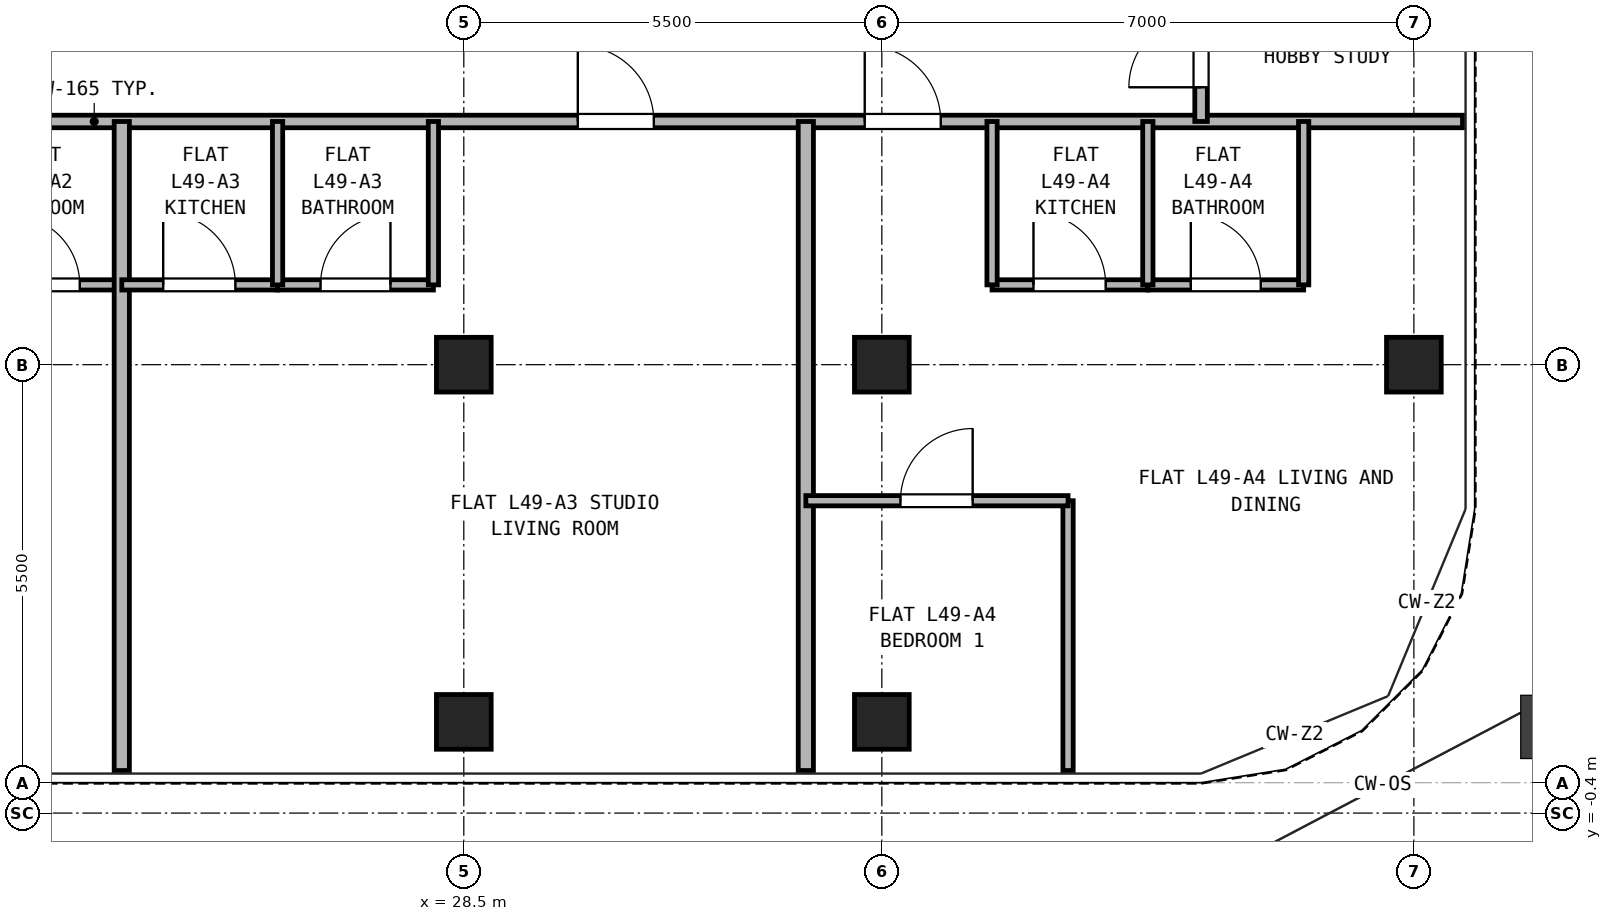
"""IFC4 building model, lengths in metres.
Left out: names, types, materials, properties, quantities, classifications, styles, units other than length and angle.
Written with IfcOpenShell. Run it as: python <this file> out.ifc"""

import sys

from ifc_helpers import new_model, si_unit, direction, frame, frame_2d, origin, origin_2d, place, context, subcontext, project, spatial, rectangle, hollow_rectangle, extrude, source, transform, mapped, element, fill, save


model = new_model("IFC4")
c1 = context("Model", 3, precision=1e-05, world=origin(), true_north=direction((0.0, 1.0)))
c2 = subcontext(c1, "Body", "Model", "MODEL_VIEW")
j1 = project(units=[si_unit("LENGTHUNIT", "METRE"), si_unit("PLANEANGLEUNIT", "RADIAN")], contexts=[c1])
p1 = place(None, origin())
s1 = spatial("IfcSite", under=j1, at=p1, CompositionType="ELEMENT")
p2 = place(p1, origin())
s2 = spatial("IfcBuilding", under=s1, at=p2, CompositionType="ELEMENT")
p3 = place(p2, frame((0.0, 0.0, 175.3)))
s3 = spatial("IfcBuildingStorey", under=s2, at=p3, CompositionType="ELEMENT", Elevation=175.3)
m1 = source(origin(), c2, "Body", "SweptSolid", [
    extrude(hollow_rectangle(XDim=0.72, YDim=0.72, WallThickness=0.04, at=origin_2d()), origin(), (0.0, 0.0, 1.0), 2.95),
])
for number, where, z_axis, x_axis in (
    (1, (28.5, 0.8, 0.0), (0.0, 0.0, 1.0), (1.0, 0.0, 0.0)),
    (2, (34.0, 0.8, 0.0), (0.0, 0.0, 1.0), (1.0, 0.0, 0.0)),
    (3, (41.0, 5.5, 0.0), (0.0, 0.0, 1.0), (1.0, 0.0, 0.0)),
    (4, (28.5, 5.5, 0.0), (0.0, 0.0, 1.0), (1.0, 0.0, 0.0)),
    (5, (34.0, 5.5, 0.0), (0.0, 0.0, 1.0), (1.0, 0.0, 0.0)),
):
    element("IfcColumn", number, at=place(p3, frame(where, z_axis=z_axis, x_axis=x_axis)), inside=s3, PredefinedType="COLUMN", context=c2, shape_type="MappedRepresentation", body=[
        mapped(m1, transform((0.0, 0.0, 0.0), x_axis=(1.0, 0.0, 0.0), y_axis=(0.0, 1.0, 0.0), z_axis=(0.0, 0.0, 1.0), scale=1.0)),
    ])
p4 = place(p3, frame((0.16, 8.7, 0.0), z_axis=(0.0, 0.0, 1.0), x_axis=(1.0, 0.0, 0.0)))
e6 = element("IfcWall", 6, at=p4, inside=s3, PredefinedType="PARTITIONING", context=c2, shape_type="SweptSolid", body=[
    extrude(rectangle(XDim=41.48, YDim=0.165, at=frame_2d((20.74, 0.0))), origin(), (0.0, 0.0, 1.0), 2.583),
])
p5 = place(p4, frame((11.815, 0.0, 0.0)))
e7 = element("IfcOpeningElement", 7, at=p5, cuts=e6, PredefinedType="OPENING", context=c2, shape_type="SweptSolid", body=[
    extrude(rectangle(XDim=1.0, YDim=2.15, at=frame_2d((0.5, 1.075))), frame((0.0, 0.093, 0.0), z_axis=(0.0, -1.0, 0.0), x_axis=(1.0, 0.0, 0.0)), (0.0, 0.0, 1.0), 0.185),
])
p6 = place(p4, frame((16.115, 0.0, 0.0)))
e8 = element("IfcOpeningElement", 8, at=p6, cuts=e6, PredefinedType="OPENING", context=c2, shape_type="SweptSolid", body=[
    extrude(rectangle(XDim=1.0, YDim=2.15, at=frame_2d((0.5, 1.075))), frame((0.0, 0.093, 0.0), z_axis=(0.0, -1.0, 0.0), x_axis=(1.0, 0.0, 0.0)), (0.0, 0.0, 1.0), 0.185),
])
p7 = place(p4, frame((29.84, 0.0, 0.0)))
e9 = element("IfcOpeningElement", 9, at=p7, cuts=e6, PredefinedType="OPENING", context=c2, shape_type="SweptSolid", body=[
    extrude(rectangle(XDim=1.0, YDim=2.15, at=frame_2d((0.5, 1.075))), frame((0.0, 0.093, 0.0), z_axis=(0.0, -1.0, 0.0), x_axis=(1.0, 0.0, 0.0)), (0.0, 0.0, 1.0), 0.185),
])
p8 = place(p4, frame((33.615, 0.0, 0.0)))
e10 = element("IfcOpeningElement", 10, at=p8, cuts=e6, PredefinedType="OPENING", context=c2, shape_type="SweptSolid", body=[
    extrude(rectangle(XDim=1.0, YDim=2.15, at=frame_2d((0.5, 1.075))), frame((0.0, 0.093, 0.0), z_axis=(0.0, -1.0, 0.0), x_axis=(1.0, 0.0, 0.0)), (0.0, 0.0, 1.0), 0.185),
])
p9 = place(p3, frame((38.2, 8.7, 0.0), z_axis=(0.0, 0.0, 1.0), x_axis=(0.0, 1.0, 0.0)))
e11 = element("IfcWall", 11, at=p9, inside=s3, PredefinedType="PARTITIONING", context=c2, shape_type="SweptSolid", body=[
    extrude(rectangle(XDim=2.0, YDim=0.165, at=frame_2d((1.0, 0.0))), origin(), (0.0, 0.0, 1.0), 2.95),
])
p10 = place(p9, frame((0.45, 0.0, 0.0)))
e12 = element("IfcOpeningElement", 12, at=p10, cuts=e11, PredefinedType="OPENING", context=c2, shape_type="SweptSolid", body=[
    extrude(rectangle(XDim=0.95, YDim=2.15, at=frame_2d((0.475, 1.075))), frame((0.0, 0.093, 0.0), z_axis=(0.0, -1.0, 0.0), x_axis=(1.0, 0.0, 0.0)), (0.0, 0.0, 1.0), 0.185),
])
p11 = place(p3, frame((21.975, 6.55, 0.0), z_axis=(0.0, 0.0, 1.0), x_axis=(1.0, 0.0, 0.0)))
e13 = element("IfcWall", 13, at=p11, inside=s3, PredefinedType="PARTITIONING", context=c2, shape_type="SweptSolid", body=[
    extrude(rectangle(XDim=2.025, YDim=0.135, at=frame_2d((1.012, 0.0))), origin(), (0.0, 0.0, 1.0), 2.95),
])
p12 = place(p11, frame((0.552, 0.0, 0.0)))
e14 = element("IfcOpeningElement", 14, at=p12, cuts=e13, PredefinedType="OPENING", context=c2, shape_type="SweptSolid", body=[
    extrude(rectangle(XDim=0.92, YDim=2.1, at=frame_2d((0.46, 1.05))), frame((0.0, 0.077, 0.0), z_axis=(0.0, -1.0, 0.0), x_axis=(1.0, 0.0, 0.0)), (0.0, 0.0, 1.0), 0.155),
])
p13 = place(p3, frame((24.0, 0.16, 0.0), z_axis=(0.0, 0.0, 1.0), x_axis=(0.0, 1.0, 0.0)))
e15 = element("IfcWall", 15, at=p13, inside=s3, PredefinedType="PARTITIONING", context=c2, shape_type="SweptSolid", body=[
    extrude(rectangle(XDim=8.54, YDim=0.2, at=frame_2d((4.27, 0.0))), origin(), (0.0, 0.0, 1.0), 2.95),
])
p14 = place(p3, frame((24.0, 6.55, 0.0), z_axis=(0.0, 0.0, 1.0), x_axis=(1.0, 0.0, 0.0)))
e16 = element("IfcWall", 16, at=p14, inside=s3, PredefinedType="PARTITIONING", context=c2, shape_type="SweptSolid", body=[
    extrude(rectangle(XDim=2.05, YDim=0.135, at=frame_2d((1.025, 0.0))), origin(), (0.0, 0.0, 1.0), 2.95),
])
p15 = place(p14, frame((0.545, 0.0, 0.0)))
e17 = element("IfcOpeningElement", 17, at=p15, cuts=e16, PredefinedType="OPENING", context=c2, shape_type="SweptSolid", body=[
    extrude(rectangle(XDim=0.95, YDim=2.15, at=frame_2d((0.475, 1.075))), frame((0.0, 0.077, 0.0), z_axis=(0.0, -1.0, 0.0), x_axis=(1.0, 0.0, 0.0)), (0.0, 0.0, 1.0), 0.155),
])
p16 = place(p3, frame((26.05, 6.55, 0.0), z_axis=(0.0, 0.0, 1.0), x_axis=(1.0, 0.0, 0.0)))
e18 = element("IfcWall", 18, at=p16, inside=s3, PredefinedType="PARTITIONING", context=c2, shape_type="SweptSolid", body=[
    extrude(rectangle(XDim=2.05, YDim=0.135, at=frame_2d((1.025, 0.0))), origin(), (0.0, 0.0, 1.0), 2.95),
])
p17 = place(p16, frame((0.565, 0.0, 0.0)))
e19 = element("IfcOpeningElement", 19, at=p17, cuts=e18, PredefinedType="OPENING", context=c2, shape_type="SweptSolid", body=[
    extrude(rectangle(XDim=0.92, YDim=2.1, at=frame_2d((0.46, 1.05))), frame((0.0, 0.077, 0.0), z_axis=(0.0, -1.0, 0.0), x_axis=(1.0, 0.0, 0.0)), (0.0, 0.0, 1.0), 0.155),
])
for number, where, z_axis, x_axis in (
    (20, (26.05, 6.55, 0.0), (0.0, 0.0, 1.0), (0.0, 1.0, 0.0)),
    (21, (28.1, 6.55, 0.0), (0.0, 0.0, 1.0), (0.0, 1.0, 0.0)),
):
    element("IfcWall", number, at=place(p3, frame(where, z_axis=z_axis, x_axis=x_axis)), inside=s3, PredefinedType="PARTITIONING", context=c2, shape_type="SweptSolid", body=[
        extrude(rectangle(XDim=2.15, YDim=0.135, at=frame_2d((1.075, 0.0))), origin(), (0.0, 0.0, 1.0), 2.95),
    ])
p18 = place(p3, frame((33.0, 0.16, 0.0), z_axis=(0.0, 0.0, 1.0), x_axis=(0.0, 1.0, 0.0)))
e22 = element("IfcWall", 22, at=p18, inside=s3, PredefinedType="PARTITIONING", context=c2, shape_type="SweptSolid", body=[
    extrude(rectangle(XDim=8.54, YDim=0.2, at=frame_2d((4.27, 0.0))), origin(), (0.0, 0.0, 1.0), 2.95),
])
p19 = place(p3, frame((35.45, 6.55, 0.0), z_axis=(0.0, 0.0, 1.0), x_axis=(1.0, 0.0, 0.0)))
e23 = element("IfcWall", 23, at=p19, inside=s3, PredefinedType="PARTITIONING", context=c2, shape_type="SweptSolid", body=[
    extrude(rectangle(XDim=2.05, YDim=0.135, at=frame_2d((1.025, 0.0))), origin(), (0.0, 0.0, 1.0), 2.95),
])
p20 = place(p19, frame((0.545, 0.0, 0.0)))
e24 = element("IfcOpeningElement", 24, at=p20, cuts=e23, PredefinedType="OPENING", context=c2, shape_type="SweptSolid", body=[
    extrude(rectangle(XDim=0.95, YDim=2.15, at=frame_2d((0.475, 1.075))), frame((0.0, 0.077, 0.0), z_axis=(0.0, -1.0, 0.0), x_axis=(1.0, 0.0, 0.0)), (0.0, 0.0, 1.0), 0.155),
])
p21 = place(p3, frame((37.5, 6.55, 0.0), z_axis=(0.0, 0.0, 1.0), x_axis=(1.0, 0.0, 0.0)))
e25 = element("IfcWall", 25, at=p21, inside=s3, PredefinedType="PARTITIONING", context=c2, shape_type="SweptSolid", body=[
    extrude(rectangle(XDim=2.05, YDim=0.135, at=frame_2d((1.025, 0.0))), origin(), (0.0, 0.0, 1.0), 2.95),
])
p22 = place(p21, frame((0.565, 0.0, 0.0)))
e26 = element("IfcOpeningElement", 26, at=p22, cuts=e25, PredefinedType="OPENING", context=c2, shape_type="SweptSolid", body=[
    extrude(rectangle(XDim=0.92, YDim=2.1, at=frame_2d((0.46, 1.05))), frame((0.0, 0.077, 0.0), z_axis=(0.0, -1.0, 0.0), x_axis=(1.0, 0.0, 0.0)), (0.0, 0.0, 1.0), 0.155),
])
for number, where, z_axis, x_axis in (
    (27, (35.45, 6.55, 0.0), (0.0, 0.0, 1.0), (0.0, 1.0, 0.0)),
    (28, (37.5, 6.55, 0.0), (0.0, 0.0, 1.0), (0.0, 1.0, 0.0)),
    (29, (39.55, 6.55, 0.0), (0.0, 0.0, 1.0), (0.0, 1.0, 0.0)),
):
    element("IfcWall", number, at=place(p3, frame(where, z_axis=z_axis, x_axis=x_axis)), inside=s3, PredefinedType="PARTITIONING", context=c2, shape_type="SweptSolid", body=[
        extrude(rectangle(XDim=2.15, YDim=0.135, at=frame_2d((1.075, 0.0))), origin(), (0.0, 0.0, 1.0), 2.95),
    ])
p23 = place(p3, frame((36.45, 0.16, 0.0), z_axis=(0.0, 0.0, 1.0), x_axis=(0.0, 1.0, 0.0)))
e30 = element("IfcWall", 30, at=p23, inside=s3, PredefinedType="PARTITIONING", context=c2, shape_type="SweptSolid", body=[
    extrude(rectangle(XDim=3.55, YDim=0.135, at=frame_2d((1.775, 0.0))), origin(), (0.0, 0.0, 1.0), 2.95),
])
p24 = place(p3, frame((33.0, 3.71, 0.0), z_axis=(0.0, 0.0, 1.0), x_axis=(1.0, 0.0, 0.0)))
e31 = element("IfcWall", 31, at=p24, inside=s3, PredefinedType="PARTITIONING", context=c2, shape_type="SweptSolid", body=[
    extrude(rectangle(XDim=3.45, YDim=0.135, at=frame_2d((1.725, 0.0))), origin(), (0.0, 0.0, 1.0), 2.95),
])
p25 = place(p24, frame((1.245, 0.0, 0.0)))
e32 = element("IfcOpeningElement", 32, at=p25, cuts=e31, PredefinedType="OPENING", context=c2, shape_type="SweptSolid", body=[
    extrude(rectangle(XDim=0.95, YDim=2.15, at=frame_2d((0.475, 1.075))), frame((0.0, 0.077, 0.0), z_axis=(0.0, -1.0, 0.0), x_axis=(1.0, 0.0, 0.0)), (0.0, 0.0, 1.0), 0.155),
])
p26 = place(p12, origin())
e33 = element("IfcDoor", 33, at=p26, inside=s3, OperationType="SINGLE_SWING_LEFT", PredefinedType="DOOR", context=c2, shape_type="SweptSolid", body=[
    extrude(rectangle(XDim=0.92, YDim=2.1, at=frame_2d((0.46, 1.05))), frame((0.0, 0.025, 0.0), z_axis=(0.0, -1.0, 0.0), x_axis=(1.0, 0.0, 0.0)), (0.0, 0.0, 1.0), 0.05),
])
fill(e14, e33)
p27 = place(p15, origin())
e34 = element("IfcDoor", 34, at=p27, inside=s3, OperationType="SINGLE_SWING_LEFT", PredefinedType="DOOR", context=c2, shape_type="SweptSolid", body=[
    extrude(rectangle(XDim=0.95, YDim=2.15, at=frame_2d((0.475, 1.075))), frame((0.0, 0.025, 0.0), z_axis=(0.0, -1.0, 0.0), x_axis=(1.0, 0.0, 0.0)), (0.0, 0.0, 1.0), 0.05),
])
fill(e17, e34)
p28 = place(p17, origin())
e35 = element("IfcDoor", 35, at=p28, inside=s3, OperationType="SINGLE_SWING_RIGHT", PredefinedType="DOOR", context=c2, shape_type="SweptSolid", body=[
    extrude(rectangle(XDim=0.92, YDim=2.1, at=frame_2d((0.46, 1.05))), frame((0.0, 0.025, 0.0), z_axis=(0.0, -1.0, 0.0), x_axis=(1.0, 0.0, 0.0)), (0.0, 0.0, 1.0), 0.05),
])
fill(e19, e35)
p29 = place(p7, frame((1.0, 0.0, 0.0), z_axis=(0.0, 0.0, 1.0), x_axis=(-1.0, 0.0, 0.0)))
e36 = element("IfcDoor", 36, at=p29, inside=s3, OperationType="SINGLE_SWING_LEFT", PredefinedType="DOOR", context=c2, shape_type="SweptSolid", body=[
    extrude(rectangle(XDim=1.0, YDim=2.15, at=frame_2d((0.5, 1.075))), frame((0.0, 0.025, 0.0), z_axis=(0.0, -1.0, 0.0), x_axis=(1.0, 0.0, 0.0)), (0.0, 0.0, 1.0), 0.05),
])
fill(e9, e36)
p30 = place(p20, origin())
e37 = element("IfcDoor", 37, at=p30, inside=s3, OperationType="SINGLE_SWING_LEFT", PredefinedType="DOOR", context=c2, shape_type="SweptSolid", body=[
    extrude(rectangle(XDim=0.95, YDim=2.15, at=frame_2d((0.475, 1.075))), frame((0.0, 0.025, 0.0), z_axis=(0.0, -1.0, 0.0), x_axis=(1.0, 0.0, 0.0)), (0.0, 0.0, 1.0), 0.05),
])
fill(e24, e37)
p31 = place(p22, origin())
e38 = element("IfcDoor", 38, at=p31, inside=s3, OperationType="SINGLE_SWING_LEFT", PredefinedType="DOOR", context=c2, shape_type="SweptSolid", body=[
    extrude(rectangle(XDim=0.92, YDim=2.1, at=frame_2d((0.46, 1.05))), frame((0.0, 0.025, 0.0), z_axis=(0.0, -1.0, 0.0), x_axis=(1.0, 0.0, 0.0)), (0.0, 0.0, 1.0), 0.05),
])
fill(e26, e38)
p32 = place(p25, frame((0.95, 0.0, 0.0), z_axis=(0.0, 0.0, 1.0), x_axis=(-1.0, 0.0, 0.0)))
e39 = element("IfcDoor", 39, at=p32, inside=s3, OperationType="SINGLE_SWING_RIGHT", PredefinedType="DOOR", context=c2, shape_type="SweptSolid", body=[
    extrude(rectangle(XDim=0.95, YDim=2.15, at=frame_2d((0.475, 1.075))), frame((0.0, 0.025, 0.0), z_axis=(0.0, -1.0, 0.0), x_axis=(1.0, 0.0, 0.0)), (0.0, 0.0, 1.0), 0.05),
])
fill(e32, e39)
p33 = place(p8, frame((1.0, 0.0, 0.0), z_axis=(0.0, 0.0, 1.0), x_axis=(-1.0, 0.0, 0.0)))
e40 = element("IfcDoor", 40, at=p33, inside=s3, OperationType="SINGLE_SWING_LEFT", PredefinedType="DOOR", context=c2, shape_type="SweptSolid", body=[
    extrude(rectangle(XDim=1.0, YDim=2.15, at=frame_2d((0.5, 1.075))), frame((0.0, 0.025, 0.0), z_axis=(0.0, -1.0, 0.0), x_axis=(1.0, 0.0, 0.0)), (0.0, 0.0, 1.0), 0.05),
])
fill(e10, e40)
p34 = place(p10, origin())
e41 = element("IfcDoor", 41, at=p34, inside=s3, OperationType="SINGLE_SWING_LEFT", PredefinedType="DOOR", context=c2, shape_type="SweptSolid", body=[
    extrude(rectangle(XDim=0.95, YDim=2.15, at=frame_2d((0.475, 1.075))), frame((0.0, 0.025, 0.0), z_axis=(0.0, -1.0, 0.0), x_axis=(1.0, 0.0, 0.0)), (0.0, 0.0, 1.0), 0.05),
])
fill(e12, e41)
save(model, sys.argv[1])
